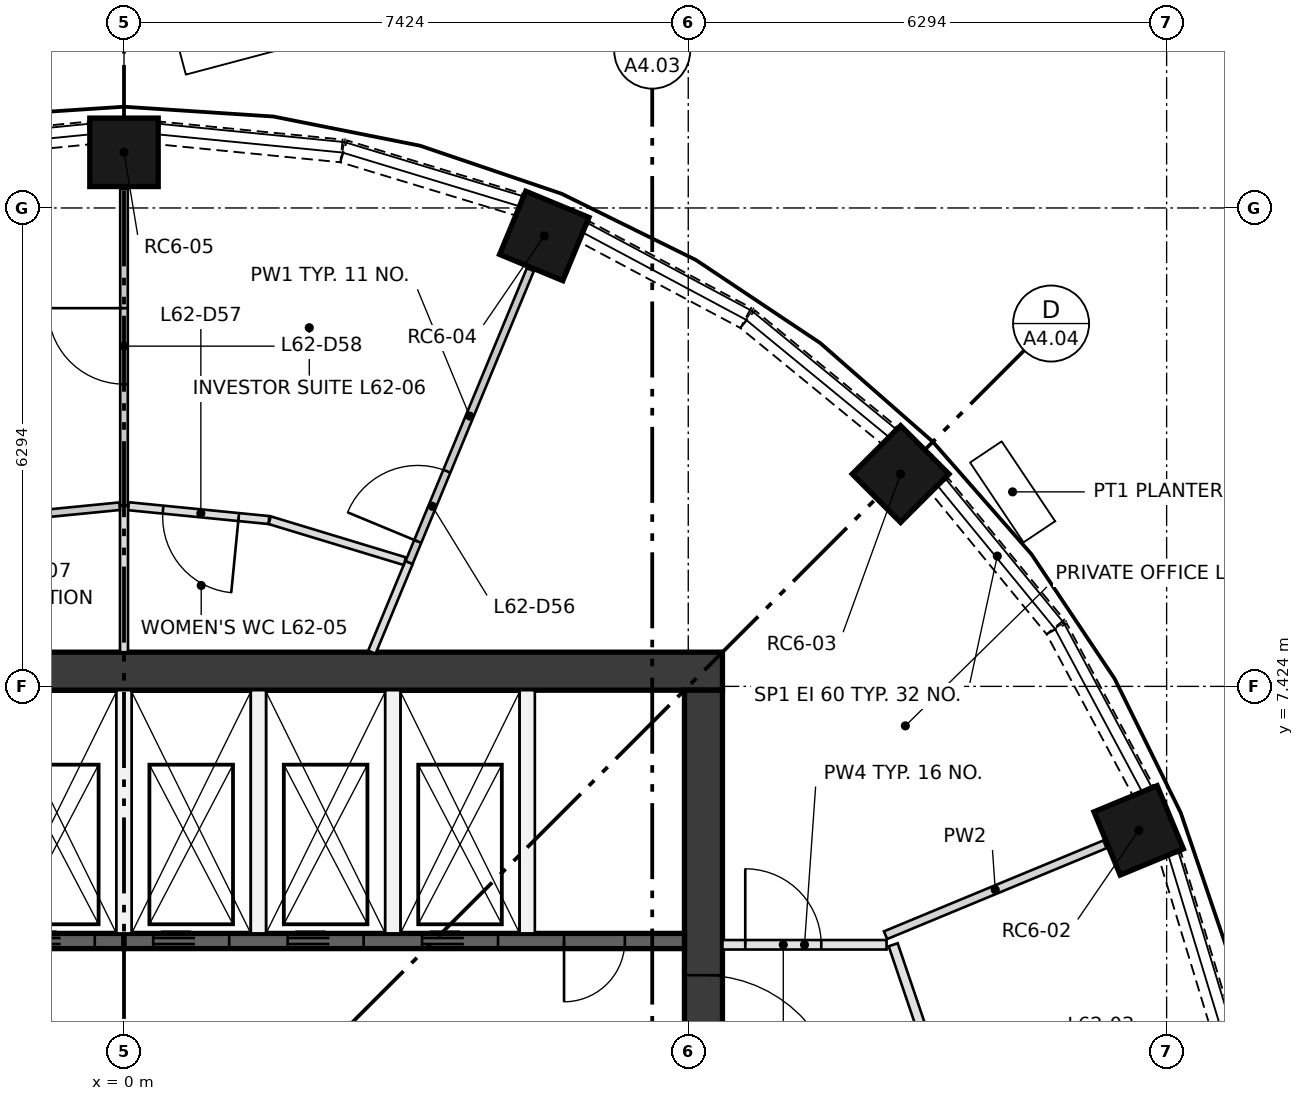
"""IFC4 building model, lengths in metres.
Left out: names, types, materials, properties, quantities, classifications, styles, units other than length and angle.
Written with IfcOpenShell. Run it as: python <this file> out.ifc"""

import sys

from ifc_helpers import new_model, si_unit, direction, frame, frame_2d, origin, origin_2d, place, context, subcontext, project, spatial, rectangle, extrude, element, fill, save


model = new_model("IFC4")
c1 = context("Model", 3, precision=1e-05, world=origin(), true_north=direction((0.0, 1.0)))
c2 = subcontext(c1, "Body", "Model", "MODEL_VIEW")
j1 = project(units=[si_unit("LENGTHUNIT", "METRE"), si_unit("PLANEANGLEUNIT", "RADIAN")], contexts=[c1])
p1 = place(None, origin())
s1 = spatial("IfcSite", under=j1, at=p1, CompositionType="ELEMENT")
p2 = place(p1, origin())
s2 = spatial("IfcBuilding", under=s1, at=p2, CompositionType="ELEMENT")
p3 = place(p2, frame((0.0, 0.0, 227.85)))
s3 = spatial("IfcBuildingStorey", under=s2, at=p3, CompositionType="ELEMENT", Elevation=227.85)
for number, where, z_axis, x_axis in (
    (1, (13.35, 5.53, 0.5), (0.0, 0.0, 1.0), (0.924, 0.383, 0.0)),
    (2, (10.218, 10.218, 0.5), (0.0, 0.0, 1.0), (0.707, 0.707, 0.0)),
    (3, (5.53, 13.35, 0.5), (0.0, 0.0, 1.0), (0.383, 0.924, 0.0)),
    (4, (0.0, 14.45, 0.5), (0.0, 0.0, 1.0), (0.0, 1.0, 0.0)),
):
    element("IfcColumn", number, at=place(p3, frame(where, z_axis=z_axis, x_axis=x_axis)), inside=s3, PredefinedType="COLUMN", context=c2, shape_type="SweptSolid", body=[
        extrude(rectangle(XDim=0.9, YDim=0.9, at=origin_2d()), origin(), (0.0, 0.0, 1.0), 2.35),
    ])
p4 = place(p3, frame((-7.874, 7.624, 0.0), z_axis=(0.0, 0.0, 1.0), x_axis=(1.0, 0.0, 0.0)))
e5 = element("IfcWall", 5, at=p4, inside=s3, PredefinedType="SHEAR", context=c2, shape_type="SweptSolid", body=[
    extrude(rectangle(XDim=15.748, YDim=0.5, at=frame_2d((7.874, 0.0))), origin(), (0.0, 0.0, 1.0), 3.35),
])
p5 = place(p3, frame((7.624, -7.374, 0.0), z_axis=(0.0, 0.0, 1.0), x_axis=(0.0, 1.0, 0.0)))
e6 = element("IfcWall", 6, at=p5, inside=s3, PredefinedType="SHEAR", context=c2, shape_type="SweptSolid", body=[
    extrude(rectangle(XDim=14.748, YDim=0.5, at=frame_2d((7.374, 0.0))), origin(), (0.0, 0.0, 1.0), 3.35),
])
p6 = place(p5, frame((6.874, 0.0, 0.0)))
e7 = element("IfcOpeningElement", 7, at=p6, cuts=e6, PredefinedType="OPENING", context=c2, shape_type="SweptSolid", body=[
    extrude(rectangle(XDim=1.0, YDim=2.1, at=frame_2d((0.5, 1.05))), frame((0.0, 0.26, 0.0), z_axis=(0.0, -1.0, 0.0), x_axis=(1.0, 0.0, 0.0)), (0.0, 0.0, 1.0), 0.52),
])
p7 = place(p5, frame((3.75, 0.0, 0.0)))
e8 = element("IfcOpeningElement", 8, at=p7, cuts=e6, PredefinedType="OPENING", context=c2, shape_type="SweptSolid", body=[
    extrude(rectangle(XDim=1.8, YDim=2.1, at=frame_2d((0.9, 1.05))), frame((0.0, 0.26, 0.0), z_axis=(0.0, -1.0, 0.0), x_axis=(1.0, 0.0, 0.0)), (0.0, 0.0, 1.0), 0.52),
])
p8 = place(p5, frame((9.198, 0.0, 0.0)))
e9 = element("IfcOpeningElement", 9, at=p8, cuts=e6, PredefinedType="OPENING", context=c2, shape_type="SweptSolid", body=[
    extrude(rectangle(XDim=1.8, YDim=2.1, at=frame_2d((0.9, 1.05))), frame((0.0, 0.26, 0.0), z_axis=(0.0, -1.0, 0.0), x_axis=(1.0, 0.0, 0.0)), (0.0, 0.0, 1.0), 0.52),
])
p9 = place(p3, frame((-7.374, 4.074, 0.0), z_axis=(0.0, 0.0, 1.0), x_axis=(1.0, 0.0, 0.0)))
e10 = element("IfcWall", 10, at=p9, inside=s3, PredefinedType="SHEAR", context=c2, shape_type="SweptSolid", body=[
    extrude(rectangle(XDim=7.374, YDim=0.2, at=frame_2d((3.687, 0.0))), origin(), (0.0, 0.0, 1.0), 3.0),
])
p10 = place(p9, frame((0.684, 0.0, 0.0)))
e11 = element("IfcOpeningElement", 11, at=p10, cuts=e10, PredefinedType="OPENING", context=c2, shape_type="SweptSolid", body=[
    extrude(rectangle(XDim=1.0, YDim=2.1, at=frame_2d((0.5, 1.05))), frame((0.0, 0.11, 0.0), z_axis=(0.0, -1.0, 0.0), x_axis=(1.0, 0.0, 0.0)), (0.0, 0.0, 1.0), 0.22),
])
p11 = place(p9, frame((2.453, 0.0, 0.0)))
e12 = element("IfcOpeningElement", 12, at=p11, cuts=e10, PredefinedType="OPENING", context=c2, shape_type="SweptSolid", body=[
    extrude(rectangle(XDim=1.0, YDim=2.1, at=frame_2d((0.5, 1.05))), frame((0.0, 0.11, 0.0), z_axis=(0.0, -1.0, 0.0), x_axis=(1.0, 0.0, 0.0)), (0.0, 0.0, 1.0), 0.22),
])
p12 = place(p9, frame((4.221, 0.0, 0.0)))
e13 = element("IfcOpeningElement", 13, at=p12, cuts=e10, PredefinedType="OPENING", context=c2, shape_type="SweptSolid", body=[
    extrude(rectangle(XDim=1.0, YDim=2.1, at=frame_2d((0.5, 1.05))), frame((0.0, 0.11, 0.0), z_axis=(0.0, -1.0, 0.0), x_axis=(1.0, 0.0, 0.0)), (0.0, 0.0, 1.0), 0.22),
])
p13 = place(p9, frame((5.99, 0.0, 0.0)))
e14 = element("IfcOpeningElement", 14, at=p13, cuts=e10, PredefinedType="OPENING", context=c2, shape_type="SweptSolid", body=[
    extrude(rectangle(XDim=1.0, YDim=2.1, at=frame_2d((0.5, 1.05))), frame((0.0, 0.11, 0.0), z_axis=(0.0, -1.0, 0.0), x_axis=(1.0, 0.0, 0.0)), (0.0, 0.0, 1.0), 0.22),
])
p14 = place(p3, frame((0.0, 4.074, 0.0), z_axis=(0.0, 0.0, 1.0), x_axis=(1.0, 0.0, 0.0)))
e15 = element("IfcWall", 15, at=p14, inside=s3, PredefinedType="SHEAR", context=c2, shape_type="SweptSolid", body=[
    extrude(rectangle(XDim=7.374, YDim=0.2, at=frame_2d((3.687, 0.0))), origin(), (0.0, 0.0, 1.0), 3.0),
])
p15 = place(p14, frame((0.384, 0.0, 0.0)))
e16 = element("IfcOpeningElement", 16, at=p15, cuts=e15, PredefinedType="OPENING", context=c2, shape_type="SweptSolid", body=[
    extrude(rectangle(XDim=1.0, YDim=2.1, at=frame_2d((0.5, 1.05))), frame((0.0, 0.11, 0.0), z_axis=(0.0, -1.0, 0.0), x_axis=(1.0, 0.0, 0.0)), (0.0, 0.0, 1.0), 0.22),
])
p16 = place(p14, frame((2.153, 0.0, 0.0)))
e17 = element("IfcOpeningElement", 17, at=p16, cuts=e15, PredefinedType="OPENING", context=c2, shape_type="SweptSolid", body=[
    extrude(rectangle(XDim=1.0, YDim=2.1, at=frame_2d((0.5, 1.05))), frame((0.0, 0.11, 0.0), z_axis=(0.0, -1.0, 0.0), x_axis=(1.0, 0.0, 0.0)), (0.0, 0.0, 1.0), 0.22),
])
p17 = place(p14, frame((3.921, 0.0, 0.0)))
e18 = element("IfcOpeningElement", 18, at=p17, cuts=e15, PredefinedType="OPENING", context=c2, shape_type="SweptSolid", body=[
    extrude(rectangle(XDim=1.0, YDim=2.1, at=frame_2d((0.5, 1.05))), frame((0.0, 0.11, 0.0), z_axis=(0.0, -1.0, 0.0), x_axis=(1.0, 0.0, 0.0)), (0.0, 0.0, 1.0), 0.22),
])
p18 = place(p14, frame((5.79, 0.0, 0.0)))
e19 = element("IfcOpeningElement", 19, at=p18, cuts=e15, PredefinedType="OPENING", context=c2, shape_type="SweptSolid", body=[
    extrude(rectangle(XDim=0.8, YDim=2.1, at=frame_2d((0.4, 1.05))), frame((0.0, 0.11, 0.0), z_axis=(0.0, -1.0, 0.0), x_axis=(1.0, 0.0, 0.0)), (0.0, 0.0, 1.0), 0.22),
])
for number, where, z_axis, x_axis in (
    (20, (0.0, 4.174, 0.0), (0.0, 0.0, 1.0), (0.0, 1.0, 0.0)),
    (21, (1.769, 4.174, 0.0), (0.0, 0.0, 1.0), (0.0, 1.0, 0.0)),
    (22, (3.537, 4.174, 0.0), (0.0, 0.0, 1.0), (0.0, 1.0, 0.0)),
    (23, (5.305, 4.174, 0.0), (0.0, 0.0, 1.0), (0.0, 1.0, 0.0)),
):
    element("IfcWall", number, at=place(p3, frame(where, z_axis=z_axis, x_axis=x_axis)), inside=s3, PredefinedType="PARTITIONING", context=c2, shape_type="SweptSolid", body=[
        extrude(rectangle(XDim=3.2, YDim=0.2, at=frame_2d((1.6, 0.0))), origin(), (0.0, 0.0, 1.0), 3.0),
    ])
p19 = place(p3, frame((14.463, 2.891, 0.0), z_axis=(0.0, 0.0, 1.0), x_axis=(-0.290412066449, 0.956901683383, 0.0)))
e24 = element("IfcWall", 24, at=p19, inside=s3, PredefinedType="SOLIDWALL", context=c2, shape_type="SweptSolid", body=[
    extrude(rectangle(XDim=2.411, YDim=0.3, at=frame_2d((1.206, 0.0))), origin(), (0.0, 0.0, 1.0), 0.9),
])
p20 = place(p3, frame((13.407, 6.055, 0.0), z_axis=(0.0, 0.0, 1.0), x_axis=(-0.471318859495, 0.881962886229, 0.0)))
e25 = element("IfcWall", 25, at=p20, inside=s3, PredefinedType="SOLIDWALL", context=c2, shape_type="SweptSolid", body=[
    extrude(rectangle(XDim=2.41, YDim=0.3, at=frame_2d((1.205, 0.0))), origin(), (0.0, 0.0, 1.0), 0.9),
])
for number, where, z_axis, x_axis in (
    (26, (12.254, 8.206, 0.0), (0.0, 0.0, 1.0), (-0.634, 0.773, 0.0)),
    (27, (10.07, 10.726, 0.0), (0.0, 0.0, 1.0), (-0.773, 0.634, 0.0)),
):
    element("IfcWall", number, at=place(p3, frame(where, z_axis=z_axis, x_axis=x_axis)), inside=s3, PredefinedType="SOLIDWALL", context=c2, shape_type="SweptSolid", body=[
        extrude(rectangle(XDim=2.411, YDim=0.3, at=frame_2d((1.206, 0.0))), origin(), (0.0, 0.0, 1.0), 0.9),
    ])
p21 = place(p3, frame((8.181, 12.271, 0.0), z_axis=(0.0, 0.0, 1.0), x_axis=(-0.881962886229, 0.471318859495, 0.0)))
e28 = element("IfcWall", 28, at=p21, inside=s3, PredefinedType="SOLIDWALL", context=c2, shape_type="SweptSolid", body=[
    extrude(rectangle(XDim=2.41, YDim=0.3, at=frame_2d((1.205, 0.0))), origin(), (0.0, 0.0, 1.0), 0.9),
])
p22 = place(p3, frame((5.198, 13.762, 0.0), z_axis=(0.0, 0.0, 1.0), x_axis=(-0.956901683383, 0.290412066449, 0.0)))
e29 = element("IfcWall", 29, at=p22, inside=s3, PredefinedType="SOLIDWALL", context=c2, shape_type="SweptSolid", body=[
    extrude(rectangle(XDim=2.411, YDim=0.3, at=frame_2d((1.206, 0.0))), origin(), (0.0, 0.0, 1.0), 0.9),
])
for number, where, z_axis, x_axis in (
    (30, (2.862, 14.469, 0.0), (0.0, 0.0, 1.0), (-0.995, 0.098, 0.0)),
    (31, (-0.463, 14.705, 0.0), (0.0, 0.0, 1.0), (-0.995, -0.098, 0.0)),
):
    element("IfcWall", number, at=place(p3, frame(where, z_axis=z_axis, x_axis=x_axis)), inside=s3, PredefinedType="SOLIDWALL", context=c2, shape_type="SweptSolid", body=[
        extrude(rectangle(XDim=2.411, YDim=0.3, at=frame_2d((1.205, 0.0))), origin(), (0.0, 0.0, 1.0), 0.9),
    ])
p23 = place(p3, frame((10.12, 4.024, 0.0), z_axis=(0.0, 0.0, 1.0), x_axis=(0.321484610675, -0.946914803506, 0.0)))
e32 = element("IfcWall", 32, at=p23, inside=s3, PredefinedType="PARTITIONING", context=c2, shape_type="SweptSolid", body=[
    extrude(rectangle(XDim=1.267, YDim=0.125, at=frame_2d((0.633, 0.0))), origin(), (0.0, 0.0, 1.0), 3.0),
])
p24 = place(p3, frame((7.874, 4.024, 0.0), z_axis=(0.0, 0.0, 1.0), x_axis=(1.0, 0.0, 0.0)))
e33 = element("IfcWall", 33, at=p24, inside=s3, PredefinedType="PARTITIONING", context=c2, shape_type="SweptSolid", body=[
    extrude(rectangle(XDim=2.159, YDim=0.125, at=frame_2d((1.08, 0.0))), origin(), (0.0, 0.0, 1.0), 3.0),
])
p25 = place(p24, frame((0.3, 0.0, 0.0)))
e34 = element("IfcOpeningElement", 34, at=p25, cuts=e33, PredefinedType="OPENING", context=c2, shape_type="SweptSolid", body=[
    extrude(rectangle(XDim=1.0, YDim=2.1, at=frame_2d((0.5, 1.05))), frame((0.0, 0.073, 0.0), z_axis=(0.0, -1.0, 0.0), x_axis=(1.0, 0.0, 0.0)), (0.0, 0.0, 1.0), 0.145),
])
p26 = place(p3, frame((10.02, 4.15, 0.0), z_axis=(0.0, 0.0, 1.0), x_axis=(0.923853990342, 0.382745090798, 0.0)))
e35 = element("IfcWall", 35, at=p26, inside=s3, PredefinedType="PARTITIONING", context=c2, shape_type="SweptSolid", body=[
    extrude(rectangle(XDim=3.125, YDim=0.11, at=frame_2d((1.562, 0.0))), origin(), (0.0, 0.0, 1.0), 3.0),
])
p27 = place(p3, frame((3.261, 7.874, 0.0), z_axis=(0.0, 0.0, 1.0), x_axis=(0.382700703766, 0.923872378273, 0.0)))
e36 = element("IfcWall", 36, at=p27, inside=s3, PredefinedType="PARTITIONING", context=c2, shape_type="SweptSolid", body=[
    extrude(rectangle(XDim=1.277, YDim=0.105, at=frame_2d((0.639, 0.0))), origin(), (0.0, 0.0, 1.0), 3.0),
])
p28 = place(p3, frame((3.75, 9.054, 0.0), z_axis=(0.0, 0.0, 1.0), x_axis=(0.382718911932, 0.923864835595, 0.0)))
e37 = element("IfcWall", 37, at=p28, inside=s3, PredefinedType="PARTITIONING", context=c2, shape_type="SweptSolid", body=[
    extrude(rectangle(XDim=4.17, YDim=0.1, at=frame_2d((2.085, 0.0))), origin(), (0.0, 0.0, 1.0), 3.0),
])
p29 = place(p28, frame((0.3, 0.0, 0.0)))
e38 = element("IfcOpeningElement", 38, at=p29, cuts=e37, PredefinedType="OPENING", context=c2, shape_type="SweptSolid", body=[
    extrude(rectangle(XDim=1.0, YDim=2.1, at=frame_2d((0.5, 1.05))), frame((0.0, 0.06, 0.0), z_axis=(0.0, -1.0, 0.0), x_axis=(1.0, 0.0, 0.0)), (0.0, 0.0, 1.0), 0.12),
])
p30 = place(p3, frame((1.907, 9.612, 0.0), z_axis=(0.0, 0.0, 1.0), x_axis=(-0.99519720103, 0.097890403323, 0.0)))
e39 = element("IfcWall", 39, at=p30, inside=s3, PredefinedType="PARTITIONING", context=c2, shape_type="SweptSolid", body=[
    extrude(rectangle(XDim=1.858, YDim=0.105, at=frame_2d((0.929, 0.0))), origin(), (0.0, 0.0, 1.0), 3.0),
])
p31 = place(p30, frame((0.4, 0.0, 0.0)))
e40 = element("IfcOpeningElement", 40, at=p31, cuts=e39, PredefinedType="OPENING", context=c2, shape_type="SweptSolid", body=[
    extrude(rectangle(XDim=1.0, YDim=2.1, at=frame_2d((0.5, 1.05))), frame((0.0, 0.062, 0.0), z_axis=(0.0, -1.0, 0.0), x_axis=(1.0, 0.0, 0.0)), (0.0, 0.0, 1.0), 0.125),
])
p32 = place(p3, frame((1.917, 9.61, 0.0), z_axis=(0.0, 0.0, 1.0), x_axis=(0.956950332284, -0.290251720996, 0.0)))
e41 = element("IfcWall", 41, at=p32, inside=s3, PredefinedType="PARTITIONING", context=c2, shape_type="SweptSolid", body=[
    extrude(rectangle(XDim=1.858, YDim=0.105, at=frame_2d((0.929, 0.0))), origin(), (0.0, 0.0, 1.0), 3.0),
])
p33 = place(p3, frame((0.0, 7.874, 0.0), z_axis=(0.0, 0.0, 1.0), x_axis=(0.0, 1.0, 0.0)))
e42 = element("IfcWall", 42, at=p33, inside=s3, PredefinedType="PARTITIONING", context=c2, shape_type="SweptSolid", body=[
    extrude(rectangle(XDim=1.926, YDim=0.105, at=frame_2d((0.963, 0.0))), origin(), (0.0, 0.0, 1.0), 3.0),
])
p34 = place(p3, frame((0.0, 9.8, 0.0), z_axis=(0.0, 0.0, 1.0), x_axis=(0.0, 1.0, 0.0)))
e43 = element("IfcWall", 43, at=p34, inside=s3, PredefinedType="PARTITIONING", context=c2, shape_type="SweptSolid", body=[
    extrude(rectangle(XDim=4.17, YDim=0.1, at=frame_2d((2.085, 0.0))), origin(), (0.0, 0.0, 1.0), 3.0),
])
p35 = place(p34, frame((1.6, 0.0, 0.0)))
e44 = element("IfcOpeningElement", 44, at=p35, cuts=e43, PredefinedType="OPENING", context=c2, shape_type="SweptSolid", body=[
    extrude(rectangle(XDim=1.0, YDim=2.1, at=frame_2d((0.5, 1.05))), frame((0.0, 0.06, 0.0), z_axis=(0.0, -1.0, 0.0), x_axis=(1.0, 0.0, 0.0)), (0.0, 0.0, 1.0), 0.12),
])
p36 = place(p3, frame((-1.907, 9.612, 0.0), z_axis=(0.0, 0.0, 1.0), x_axis=(0.995199718264, 0.09786480862, 0.0)))
e45 = element("IfcWall", 45, at=p36, inside=s3, PredefinedType="PARTITIONING", context=c2, shape_type="SweptSolid", body=[
    extrude(rectangle(XDim=1.859, YDim=0.1, at=frame_2d((0.929, 0.0))), origin(), (0.0, 0.0, 1.0), 3.0),
])
p37 = place(p13, frame((1.0, 0.0, 0.0), z_axis=(0.0, 0.0, 1.0), x_axis=(-1.0, 0.0, 0.0)))
e46 = element("IfcDoor", 46, at=p37, inside=s3, OperationType="DOUBLE_DOOR_SLIDING", PredefinedType="DOOR", context=c2, shape_type="SweptSolid", body=[
    extrude(rectangle(XDim=1.0, YDim=2.1, at=frame_2d((0.5, 1.05))), frame((0.0, 0.025, 0.0), z_axis=(0.0, -1.0, 0.0), x_axis=(1.0, 0.0, 0.0)), (0.0, 0.0, 1.0), 0.05),
])
fill(e14, e46)
p38 = place(p15, frame((1.0, 0.0, 0.0), z_axis=(0.0, 0.0, 1.0), x_axis=(-1.0, 0.0, 0.0)))
e47 = element("IfcDoor", 47, at=p38, inside=s3, OperationType="DOUBLE_DOOR_SLIDING", PredefinedType="DOOR", context=c2, shape_type="SweptSolid", body=[
    extrude(rectangle(XDim=1.0, YDim=2.1, at=frame_2d((0.5, 1.05))), frame((0.0, 0.025, 0.0), z_axis=(0.0, -1.0, 0.0), x_axis=(1.0, 0.0, 0.0)), (0.0, 0.0, 1.0), 0.05),
])
fill(e16, e47)
p39 = place(p16, frame((1.0, 0.0, 0.0), z_axis=(0.0, 0.0, 1.0), x_axis=(-1.0, 0.0, 0.0)))
e48 = element("IfcDoor", 48, at=p39, inside=s3, OperationType="DOUBLE_DOOR_SLIDING", PredefinedType="DOOR", context=c2, shape_type="SweptSolid", body=[
    extrude(rectangle(XDim=1.0, YDim=2.1, at=frame_2d((0.5, 1.05))), frame((0.0, 0.025, 0.0), z_axis=(0.0, -1.0, 0.0), x_axis=(1.0, 0.0, 0.0)), (0.0, 0.0, 1.0), 0.05),
])
fill(e17, e48)
p40 = place(p17, frame((1.0, 0.0, 0.0), z_axis=(0.0, 0.0, 1.0), x_axis=(-1.0, 0.0, 0.0)))
e49 = element("IfcDoor", 49, at=p40, inside=s3, OperationType="DOUBLE_DOOR_SLIDING", PredefinedType="DOOR", context=c2, shape_type="SweptSolid", body=[
    extrude(rectangle(XDim=1.0, YDim=2.1, at=frame_2d((0.5, 1.05))), frame((0.0, 0.025, 0.0), z_axis=(0.0, -1.0, 0.0), x_axis=(1.0, 0.0, 0.0)), (0.0, 0.0, 1.0), 0.05),
])
fill(e18, e49)
p41 = place(p18, frame((0.8, 0.0, 0.0), z_axis=(0.0, 0.0, 1.0), x_axis=(-1.0, 0.0, 0.0)))
e50 = element("IfcDoor", 50, at=p41, inside=s3, OperationType="SINGLE_SWING_LEFT", PredefinedType="DOOR", context=c2, shape_type="SweptSolid", body=[
    extrude(rectangle(XDim=0.8, YDim=2.1, at=frame_2d((0.4, 1.05))), frame((0.0, 0.025, 0.0), z_axis=(0.0, -1.0, 0.0), x_axis=(1.0, 0.0, 0.0)), (0.0, 0.0, 1.0), 0.05),
])
fill(e19, e50)
p42 = place(p8, frame((1.8, 0.0, 0.0), z_axis=(0.0, 0.0, 1.0), x_axis=(-1.0, 0.0, 0.0)))
e51 = element("IfcDoor", 51, at=p42, inside=s3, OperationType="DOUBLE_DOOR_SINGLE_SWING", PredefinedType="DOOR", context=c2, shape_type="SweptSolid", body=[
    extrude(rectangle(XDim=1.8, YDim=2.1, at=frame_2d((0.9, 1.05))), frame((0.0, 0.025, 0.0), z_axis=(0.0, -1.0, 0.0), x_axis=(1.0, 0.0, 0.0)), (0.0, 0.0, 1.0), 0.05),
])
fill(e9, e51)
p43 = place(p25, origin())
e52 = element("IfcDoor", 52, at=p43, inside=s3, OperationType="SINGLE_SWING_LEFT", PredefinedType="DOOR", context=c2, shape_type="SweptSolid", body=[
    extrude(rectangle(XDim=1.0, YDim=2.1, at=frame_2d((0.5, 1.05))), frame((0.0, 0.025, 0.0), z_axis=(0.0, -1.0, 0.0), x_axis=(1.0, 0.0, 0.0)), (0.0, 0.0, 1.0), 0.05),
])
fill(e34, e52)
p44 = place(p29, origin())
e53 = element("IfcDoor", 53, at=p44, inside=s3, OperationType="SINGLE_SWING_LEFT", PredefinedType="DOOR", context=c2, shape_type="SweptSolid", body=[
    extrude(rectangle(XDim=1.0, YDim=2.1, at=frame_2d((0.5, 1.05))), frame((0.0, 0.025, 0.0), z_axis=(0.0, -1.0, 0.0), x_axis=(1.0, 0.0, 0.0)), (0.0, 0.0, 1.0), 0.05),
])
fill(e38, e53)
p45 = place(p31, origin())
e54 = element("IfcDoor", 54, at=p45, inside=s3, OperationType="SINGLE_SWING_LEFT", PredefinedType="DOOR", context=c2, shape_type="SweptSolid", body=[
    extrude(rectangle(XDim=1.0, YDim=2.1, at=frame_2d((0.5, 1.05))), frame((0.0, 0.025, 0.0), z_axis=(0.0, -1.0, 0.0), x_axis=(1.0, 0.0, 0.0)), (0.0, 0.0, 1.0), 0.05),
])
fill(e40, e54)
p46 = place(p35, origin())
e55 = element("IfcDoor", 55, at=p46, inside=s3, OperationType="SINGLE_SWING_RIGHT", PredefinedType="DOOR", context=c2, shape_type="SweptSolid", body=[
    extrude(rectangle(XDim=1.0, YDim=2.1, at=frame_2d((0.5, 1.05))), frame((0.0, 0.025, 0.0), z_axis=(0.0, -1.0, 0.0), x_axis=(1.0, 0.0, 0.0)), (0.0, 0.0, 1.0), 0.05),
])
fill(e44, e55)
save(model, sys.argv[1])
